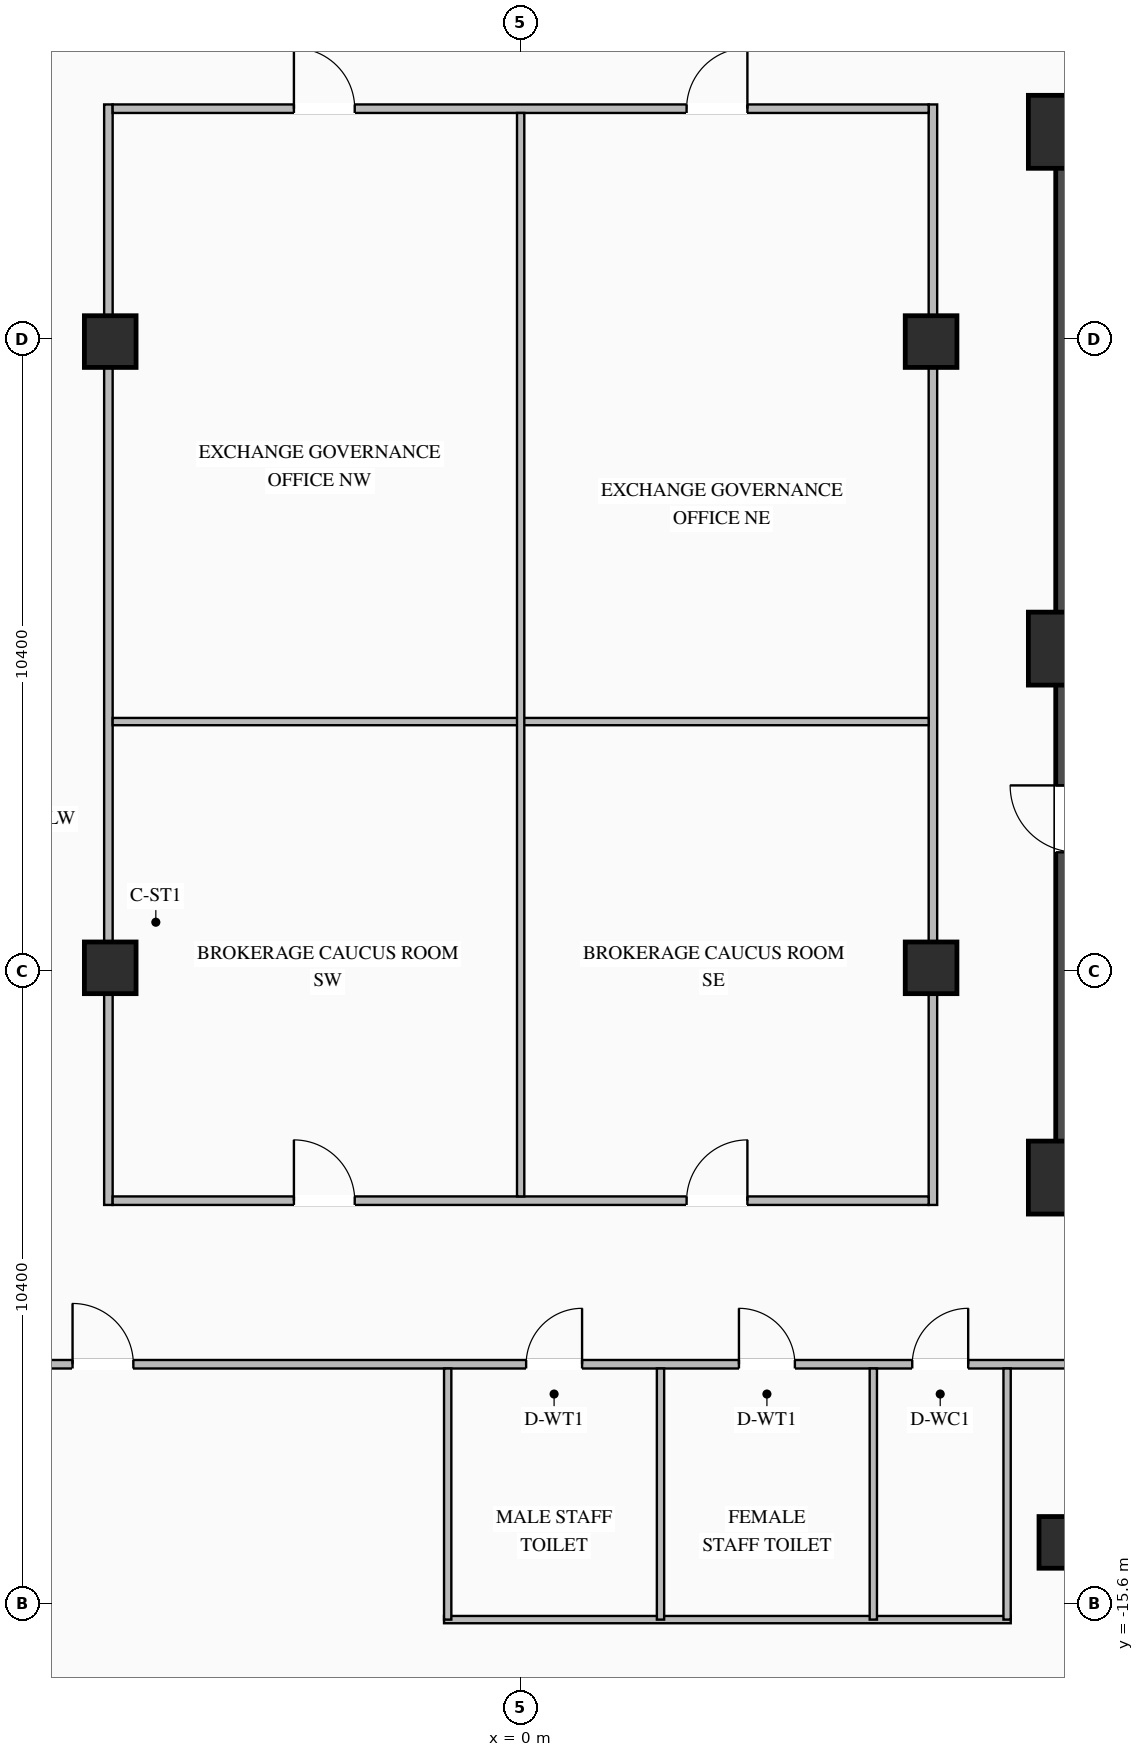
"""IFC4 building model, lengths in metres.
Left out: names, types, materials, properties, quantities, classifications, styles, units other than length and angle.
Written with IfcOpenShell. Run it as: python <this file> out.ifc"""

import sys

from ifc_helpers import new_model, si_unit, direction, frame, frame_2d, origin, origin_2d, place, context, subcontext, project, spatial, rectangle, i_section, extrude, element, fill, save


model = new_model("IFC4")
c1 = context("Model", 3, precision=1e-05, world=origin(), true_north=direction((0.0, 1.0)))
c2 = subcontext(c1, "Body", "Model", "MODEL_VIEW")
j1 = project(units=[si_unit("LENGTHUNIT", "METRE"), si_unit("PLANEANGLEUNIT", "RADIAN")], contexts=[c1])
p1 = place(None, origin())
s1 = spatial("IfcSite", under=j1, at=p1, CompositionType="ELEMENT")
p2 = place(p1, origin())
s2 = spatial("IfcBuilding", under=s1, at=p2, CompositionType="ELEMENT")
p3 = place(p2, frame((0.0, 0.0, 58.8)))
s3 = spatial("IfcBuildingStorey", under=s2, at=p3, CompositionType="ELEMENT", Elevation=58.8)
p4 = place(p3, frame((8.8, -8.7, 0.0), z_axis=(0.0, 0.0, 1.0), x_axis=(1.0, 0.0, 0.0)))
e1 = element("IfcWall", 1, at=p4, inside=s3, PredefinedType="SHEAR", context=c2, shape_type="SweptSolid", body=[
    extrude(rectangle(XDim=10.25, YDim=0.7, at=frame_2d((5.125, 0.0))), origin(), (0.0, 0.0, 1.0), 3.27),
])
p5 = place(p3, frame((8.8, 8.7, 0.0), z_axis=(0.0, 0.0, 1.0), x_axis=(1.0, 0.0, 0.0)))
e2 = element("IfcWall", 2, at=p5, inside=s3, PredefinedType="SHEAR", context=c2, shape_type="SweptSolid", body=[
    extrude(rectangle(XDim=10.25, YDim=0.7, at=frame_2d((5.125, 0.0))), origin(), (0.0, 0.0, 1.0), 3.27),
])
p6 = place(p5, frame((3.25, 0.0, 0.0)))
e3 = element("IfcOpeningElement", 3, at=p6, cuts=e2, PredefinedType="OPENING", context=c2, shape_type="SweptSolid", body=[
    extrude(rectangle(XDim=1.4, YDim=2.05, at=frame_2d((0.7, 1.025))), frame((0.0, 0.36, 0.0), z_axis=(0.0, -1.0, 0.0), x_axis=(1.0, 0.0, 0.0)), (0.0, 0.0, 1.0), 0.72),
])
p7 = place(p3, frame((9.15, -8.35, 0.0), z_axis=(0.0, 0.0, 1.0), x_axis=(0.0, 1.0, 0.0)))
e4 = element("IfcWall", 4, at=p7, inside=s3, PredefinedType="SHEAR", context=c2, shape_type="SweptSolid", body=[
    extrude(rectangle(XDim=16.7, YDim=0.7, at=frame_2d((8.35, 0.0))), origin(), (0.0, 0.0, 1.0), 3.27),
])
p8 = place(p7, frame((5.1, 0.0, 0.0)))
e5 = element("IfcOpeningElement", 5, at=p8, cuts=e4, PredefinedType="OPENING", context=c2, shape_type="SweptSolid", body=[
    extrude(rectangle(XDim=1.1, YDim=2.08, at=frame_2d((0.55, 1.04))), frame((0.0, 0.36, 0.0), z_axis=(0.0, -1.0, 0.0), x_axis=(1.0, 0.0, 0.0)), (0.0, 0.0, 1.0), 0.72),
])
for number, where, z_axis, x_axis in (
    (6, (8.95, -8.6, 0.0), (0.0, 0.0, 1.0), (1.0, 0.0, 0.0)),
    (7, (8.95, 0.1, 0.0), (0.0, 0.0, 1.0), (1.0, 0.0, 0.0)),
    (8, (8.95, 8.6, 0.0), (0.0, 0.0, 1.0), (1.0, 0.0, 0.0)),
):
    element("IfcColumn", number, at=place(p3, frame(where, z_axis=z_axis, x_axis=x_axis)), inside=s3, PredefinedType="COLUMN", context=c2, shape_type="SweptSolid", body=[
        extrude(rectangle(XDim=1.2, YDim=1.2, at=origin_2d()), origin(), (0.0, 0.0, 1.0), 3.45),
    ])
for number, where, z_axis, x_axis in (
    (9, (-6.75, -5.15, 0.0), (0.0, 0.0, 1.0), (1.0, 0.0, 0.0)),
    (10, (-6.75, 5.15, 0.0), (0.0, 0.0, 1.0), (1.0, 0.0, 0.0)),
    (11, (6.75, -5.15, 0.0), (0.0, 0.0, 1.0), (1.0, 0.0, 0.0)),
    (12, (6.75, 5.15, 0.0), (0.0, 0.0, 1.0), (1.0, 0.0, 0.0)),
    (13, (8.95, -14.6, 0.0), (0.0, 0.0, 1.0), (1.0, 0.0, 0.0)),
):
    element("IfcColumn", number, at=place(p3, frame(where, z_axis=z_axis, x_axis=x_axis)), inside=s3, PredefinedType="COLUMN", context=c2, shape_type="SweptSolid", body=[
        extrude(i_section(OverallWidth=0.85, OverallDepth=0.85, WebThickness=0.032, FlangeThickness=0.048, at=origin_2d()), origin(), (0.0, 0.0, 1.0), 3.45),
    ])
p9 = place(p3, frame((-35.62, -11.67, 0.0), z_axis=(0.0, 0.0, 1.0), x_axis=(1.0, 0.0, 0.0)))
e14 = element("IfcWall", 14, at=p9, inside=s3, PredefinedType="STANDARD", context=c2, shape_type="SweptSolid", body=[
    extrude(rectangle(XDim=71.24, YDim=0.14, at=frame_2d((35.62, 0.0))), origin(), (0.0, 0.0, 1.0), 3.25),
])
p10 = place(p9, frame((35.71, 0.0, 0.0)))
e15 = element("IfcOpeningElement", 15, at=p10, cuts=e14, PredefinedType="OPENING", context=c2, shape_type="SweptSolid", body=[
    extrude(rectangle(XDim=0.92, YDim=2.08, at=frame_2d((0.46, 1.04))), frame((0.0, 0.08, 0.0), z_axis=(0.0, -1.0, 0.0), x_axis=(1.0, 0.0, 0.0)), (0.0, 0.0, 1.0), 0.16),
])
p11 = place(p9, frame((39.21, 0.0, 0.0)))
e16 = element("IfcOpeningElement", 16, at=p11, cuts=e14, PredefinedType="OPENING", context=c2, shape_type="SweptSolid", body=[
    extrude(rectangle(XDim=0.92, YDim=2.08, at=frame_2d((0.46, 1.04))), frame((0.0, 0.08, 0.0), z_axis=(0.0, -1.0, 0.0), x_axis=(1.0, 0.0, 0.0)), (0.0, 0.0, 1.0), 0.16),
])
p12 = place(p9, frame((42.06, 0.0, 0.0)))
e17 = element("IfcOpeningElement", 17, at=p12, cuts=e14, PredefinedType="OPENING", context=c2, shape_type="SweptSolid", body=[
    extrude(rectangle(XDim=0.92, YDim=2.08, at=frame_2d((0.46, 1.04))), frame((0.0, 0.08, 0.0), z_axis=(0.0, -1.0, 0.0), x_axis=(1.0, 0.0, 0.0)), (0.0, 0.0, 1.0), 0.16),
])
p13 = place(p9, frame((5.325, 0.0, 0.0)))
e18 = element("IfcOpeningElement", 18, at=p13, cuts=e14, PredefinedType="OPENING", context=c2, shape_type="SweptSolid", body=[
    extrude(rectangle(XDim=1.0, YDim=2.08, at=frame_2d((0.5, 1.04))), frame((0.0, 0.08, 0.0), z_axis=(0.0, -1.0, 0.0), x_axis=(1.0, 0.0, 0.0)), (0.0, 0.0, 1.0), 0.16),
])
p14 = place(p9, frame((16.74, 0.0, 0.0)))
e19 = element("IfcOpeningElement", 19, at=p14, cuts=e14, PredefinedType="OPENING", context=c2, shape_type="SweptSolid", body=[
    extrude(rectangle(XDim=1.0, YDim=2.08, at=frame_2d((0.5, 1.04))), frame((0.0, 0.08, 0.0), z_axis=(0.0, -1.0, 0.0), x_axis=(1.0, 0.0, 0.0)), (0.0, 0.0, 1.0), 0.16),
])
p15 = place(p9, frame((28.25, 0.0, 0.0)))
e20 = element("IfcOpeningElement", 20, at=p15, cuts=e14, PredefinedType="OPENING", context=c2, shape_type="SweptSolid", body=[
    extrude(rectangle(XDim=1.0, YDim=2.08, at=frame_2d((0.5, 1.04))), frame((0.0, 0.08, 0.0), z_axis=(0.0, -1.0, 0.0), x_axis=(1.0, 0.0, 0.0)), (0.0, 0.0, 1.0), 0.16),
])
p16 = place(p9, frame((47.667, 0.0, 0.0)))
e21 = element("IfcOpeningElement", 21, at=p16, cuts=e14, PredefinedType="OPENING", context=c2, shape_type="SweptSolid", body=[
    extrude(rectangle(XDim=1.0, YDim=2.08, at=frame_2d((0.5, 1.04))), frame((0.0, 0.08, 0.0), z_axis=(0.0, -1.0, 0.0), x_axis=(1.0, 0.0, 0.0)), (0.0, 0.0, 1.0), 0.16),
])
p17 = place(p9, frame((56.9, 0.0, 0.0)))
e22 = element("IfcOpeningElement", 22, at=p17, cuts=e14, PredefinedType="OPENING", context=c2, shape_type="SweptSolid", body=[
    extrude(rectangle(XDim=1.0, YDim=2.08, at=frame_2d((0.5, 1.04))), frame((0.0, 0.08, 0.0), z_axis=(0.0, -1.0, 0.0), x_axis=(1.0, 0.0, 0.0)), (0.0, 0.0, 1.0), 0.16),
])
p18 = place(p9, frame((66.037, 0.0, 0.0)))
e23 = element("IfcOpeningElement", 23, at=p18, cuts=e14, PredefinedType="OPENING", context=c2, shape_type="SweptSolid", body=[
    extrude(rectangle(XDim=1.0, YDim=2.08, at=frame_2d((0.5, 1.04))), frame((0.0, 0.08, 0.0), z_axis=(0.0, -1.0, 0.0), x_axis=(1.0, 0.0, 0.0)), (0.0, 0.0, 1.0), 0.16),
])
p19 = place(p3, frame((-1.26, -15.87, 0.0), z_axis=(0.0, 0.0, 1.0), x_axis=(1.0, 0.0, 0.0)))
e24 = element("IfcWall", 24, at=p19, inside=s3, PredefinedType="STANDARD", context=c2, shape_type="SweptSolid", body=[
    extrude(rectangle(XDim=9.32, YDim=0.12, at=frame_2d((4.66, 0.0))), origin(), (0.0, 0.0, 1.0), 3.25),
])
for number, where, z_axis, x_axis in (
    (25, (-1.2, -15.87, 0.0), (0.0, 0.0, 1.0), (0.0, 1.0, 0.0)),
    (26, (2.3, -15.87, 0.0), (0.0, 0.0, 1.0), (0.0, 1.0, 0.0)),
    (27, (5.8, -15.87, 0.0), (0.0, 0.0, 1.0), (0.0, 1.0, 0.0)),
    (28, (8.0, -15.87, 0.0), (0.0, 0.0, 1.0), (0.0, 1.0, 0.0)),
):
    element("IfcWall", number, at=place(p3, frame(where, z_axis=z_axis, x_axis=x_axis)), inside=s3, PredefinedType="STANDARD", context=c2, shape_type="SweptSolid", body=[
        extrude(rectangle(XDim=4.13, YDim=0.12, at=frame_2d((2.065, 0.0))), origin(), (0.0, 0.0, 1.0), 3.25),
    ])
for number, where, z_axis, x_axis in (
    (29, (-6.78, -9.05, 0.0), (0.0, 0.0, 1.0), (0.0, 1.0, 0.0)),
    (30, (6.78, -9.05, 0.0), (0.0, 0.0, 1.0), (0.0, 1.0, 0.0)),
):
    element("IfcWall", number, at=place(p3, frame(where, z_axis=z_axis, x_axis=x_axis)), inside=s3, PredefinedType="STANDARD", context=c2, shape_type="SweptSolid", body=[
        extrude(rectangle(XDim=18.1, YDim=0.14, at=frame_2d((9.05, 0.0))), origin(), (0.0, 0.0, 1.0), 2.645),
    ])
p20 = place(p3, frame((-6.71, -8.98, 0.0), z_axis=(0.0, 0.0, 1.0), x_axis=(1.0, 0.0, 0.0)))
e31 = element("IfcWall", 31, at=p20, inside=s3, PredefinedType="STANDARD", context=c2, shape_type="SweptSolid", body=[
    extrude(rectangle(XDim=13.42, YDim=0.14, at=frame_2d((6.71, 0.0))), origin(), (0.0, 0.0, 1.0), 3.25),
])
p21 = place(p20, frame((2.981, 0.0, 0.0)))
e32 = element("IfcOpeningElement", 32, at=p21, cuts=e31, PredefinedType="OPENING", context=c2, shape_type="SweptSolid", body=[
    extrude(rectangle(XDim=1.0, YDim=2.08, at=frame_2d((0.5, 1.04))), frame((0.0, 0.08, 0.0), z_axis=(0.0, -1.0, 0.0), x_axis=(1.0, 0.0, 0.0)), (0.0, 0.0, 1.0), 0.16),
])
p22 = place(p20, frame((9.439, 0.0, 0.0)))
e33 = element("IfcOpeningElement", 33, at=p22, cuts=e31, PredefinedType="OPENING", context=c2, shape_type="SweptSolid", body=[
    extrude(rectangle(XDim=1.0, YDim=2.08, at=frame_2d((0.5, 1.04))), frame((0.0, 0.08, 0.0), z_axis=(0.0, -1.0, 0.0), x_axis=(1.0, 0.0, 0.0)), (0.0, 0.0, 1.0), 0.16),
])
p23 = place(p3, frame((-6.71, 8.98, 0.0), z_axis=(0.0, 0.0, 1.0), x_axis=(1.0, 0.0, 0.0)))
e34 = element("IfcWall", 34, at=p23, inside=s3, PredefinedType="STANDARD", context=c2, shape_type="SweptSolid", body=[
    extrude(rectangle(XDim=13.42, YDim=0.14, at=frame_2d((6.71, 0.0))), origin(), (0.0, 0.0, 1.0), 3.25),
])
p24 = place(p23, frame((2.981, 0.0, 0.0)))
e35 = element("IfcOpeningElement", 35, at=p24, cuts=e34, PredefinedType="OPENING", context=c2, shape_type="SweptSolid", body=[
    extrude(rectangle(XDim=1.0, YDim=2.08, at=frame_2d((0.5, 1.04))), frame((0.0, 0.08, 0.0), z_axis=(0.0, -1.0, 0.0), x_axis=(1.0, 0.0, 0.0)), (0.0, 0.0, 1.0), 0.16),
])
p25 = place(p23, frame((9.439, 0.0, 0.0)))
e36 = element("IfcOpeningElement", 36, at=p25, cuts=e34, PredefinedType="OPENING", context=c2, shape_type="SweptSolid", body=[
    extrude(rectangle(XDim=1.0, YDim=2.08, at=frame_2d((0.5, 1.04))), frame((0.0, 0.08, 0.0), z_axis=(0.0, -1.0, 0.0), x_axis=(1.0, 0.0, 0.0)), (0.0, 0.0, 1.0), 0.16),
])
p26 = place(p3, frame((-6.71, -1.1, 0.0), z_axis=(0.0, 0.0, 1.0), x_axis=(1.0, 0.0, 0.0)))
e37 = element("IfcWall", 37, at=p26, inside=s3, PredefinedType="STANDARD", context=c2, shape_type="SweptSolid", body=[
    extrude(rectangle(XDim=13.42, YDim=0.12, at=frame_2d((6.71, 0.0))), origin(), (0.0, 0.0, 1.0), 3.25),
])
p27 = place(p3, frame((0.0, -8.91, 0.0), z_axis=(0.0, 0.0, 1.0), x_axis=(0.0, 1.0, 0.0)))
e38 = element("IfcWall", 38, at=p27, inside=s3, PredefinedType="STANDARD", context=c2, shape_type="SweptSolid", body=[
    extrude(rectangle(XDim=17.82, YDim=0.12, at=frame_2d((8.91, 0.0))), origin(), (0.0, 0.0, 1.0), 3.25),
])
p28 = place(p10, origin())
e39 = element("IfcDoor", 39, at=p28, inside=s3, OperationType="SINGLE_SWING_RIGHT", PredefinedType="DOOR", context=c2, shape_type="SweptSolid", body=[
    extrude(rectangle(XDim=0.92, YDim=2.08, at=frame_2d((0.46, 1.04))), frame((0.0, 0.025, 0.0), z_axis=(0.0, -1.0, 0.0), x_axis=(1.0, 0.0, 0.0)), (0.0, 0.0, 1.0), 0.05),
])
fill(e15, e39)
p29 = place(p11, origin())
e40 = element("IfcDoor", 40, at=p29, inside=s3, OperationType="SINGLE_SWING_LEFT", PredefinedType="DOOR", context=c2, shape_type="SweptSolid", body=[
    extrude(rectangle(XDim=0.92, YDim=2.08, at=frame_2d((0.46, 1.04))), frame((0.0, 0.025, 0.0), z_axis=(0.0, -1.0, 0.0), x_axis=(1.0, 0.0, 0.0)), (0.0, 0.0, 1.0), 0.05),
])
fill(e16, e40)
p30 = place(p12, origin())
e41 = element("IfcDoor", 41, at=p30, inside=s3, OperationType="SINGLE_SWING_RIGHT", PredefinedType="DOOR", context=c2, shape_type="SweptSolid", body=[
    extrude(rectangle(XDim=0.92, YDim=2.08, at=frame_2d((0.46, 1.04))), frame((0.0, 0.025, 0.0), z_axis=(0.0, -1.0, 0.0), x_axis=(1.0, 0.0, 0.0)), (0.0, 0.0, 1.0), 0.05),
])
fill(e17, e41)
p31 = place(p15, origin())
e42 = element("IfcDoor", 42, at=p31, inside=s3, OperationType="SINGLE_SWING_LEFT", PredefinedType="DOOR", context=c2, shape_type="SweptSolid", body=[
    extrude(rectangle(XDim=1.0, YDim=2.08, at=frame_2d((0.5, 1.04))), frame((0.0, 0.025, 0.0), z_axis=(0.0, -1.0, 0.0), x_axis=(1.0, 0.0, 0.0)), (0.0, 0.0, 1.0), 0.05),
])
fill(e20, e42)
p32 = place(p21, origin())
e43 = element("IfcDoor", 43, at=p32, inside=s3, OperationType="SINGLE_SWING_LEFT", PredefinedType="DOOR", context=c2, shape_type="SweptSolid", body=[
    extrude(rectangle(XDim=1.0, YDim=2.08, at=frame_2d((0.5, 1.04))), frame((0.0, 0.025, 0.0), z_axis=(0.0, -1.0, 0.0), x_axis=(1.0, 0.0, 0.0)), (0.0, 0.0, 1.0), 0.05),
])
fill(e32, e43)
p33 = place(p22, origin())
e44 = element("IfcDoor", 44, at=p33, inside=s3, OperationType="SINGLE_SWING_RIGHT", PredefinedType="DOOR", context=c2, shape_type="SweptSolid", body=[
    extrude(rectangle(XDim=1.0, YDim=2.08, at=frame_2d((0.5, 1.04))), frame((0.0, 0.025, 0.0), z_axis=(0.0, -1.0, 0.0), x_axis=(1.0, 0.0, 0.0)), (0.0, 0.0, 1.0), 0.05),
])
fill(e33, e44)
p34 = place(p24, origin())
e45 = element("IfcDoor", 45, at=p34, inside=s3, OperationType="SINGLE_SWING_LEFT", PredefinedType="DOOR", context=c2, shape_type="SweptSolid", body=[
    extrude(rectangle(XDim=1.0, YDim=2.08, at=frame_2d((0.5, 1.04))), frame((0.0, 0.025, 0.0), z_axis=(0.0, -1.0, 0.0), x_axis=(1.0, 0.0, 0.0)), (0.0, 0.0, 1.0), 0.05),
])
fill(e35, e45)
p35 = place(p25, origin())
e46 = element("IfcDoor", 46, at=p35, inside=s3, OperationType="SINGLE_SWING_RIGHT", PredefinedType="DOOR", context=c2, shape_type="SweptSolid", body=[
    extrude(rectangle(XDim=1.0, YDim=2.08, at=frame_2d((0.5, 1.04))), frame((0.0, 0.025, 0.0), z_axis=(0.0, -1.0, 0.0), x_axis=(1.0, 0.0, 0.0)), (0.0, 0.0, 1.0), 0.05),
])
fill(e36, e46)
save(model, sys.argv[1])
